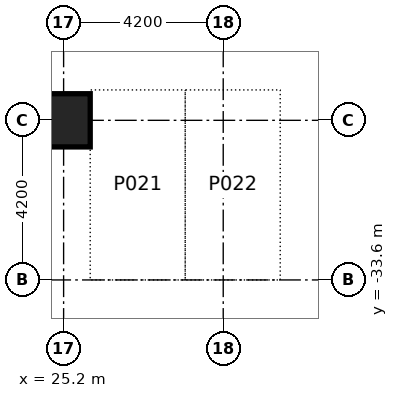
"""IFC4 building model, lengths in metres.
Left out: names, types, materials, properties, quantities, classifications, styles, units other than length and angle.
Written with IfcOpenShell. Run it as: python <this file> out.ifc"""

import sys

from ifc_helpers import new_model, si_unit, direction, frame, origin, origin_2d, place, context, subcontext, project, spatial, rectangle, extrude, element, save


model = new_model("IFC4")
c1 = context("Model", 3, precision=1e-05, world=origin(), true_north=direction((0.0, 1.0)))
c2 = subcontext(c1, "Body", "Model", "MODEL_VIEW")
j1 = project(units=[si_unit("LENGTHUNIT", "METRE"), si_unit("PLANEANGLEUNIT", "RADIAN")], contexts=[c1])
p1 = place(None, origin())
s1 = spatial("IfcSite", under=j1, at=p1, CompositionType="ELEMENT")
p2 = place(p1, origin())
s2 = spatial("IfcBuilding", under=s1, at=p2, CompositionType="ELEMENT")
p3 = place(p2, frame((0.0, 0.0, -4.2)))
s3 = spatial("IfcBuildingStorey", under=s2, at=p3, CompositionType="ELEMENT", Elevation=-4.2)
p4 = place(p3, frame((25.2, -29.4, 0.0), z_axis=(0.0, 0.0, 1.0), x_axis=(1.0, 0.0, 0.0)))
e1 = element("IfcColumn", 1, at=p4, inside=s3, PredefinedType="COLUMN", context=c2, shape_type="SweptSolid", body=[
    extrude(rectangle(XDim=1.4, YDim=1.4, at=origin_2d()), origin(), (0.0, 0.0, 1.0), 4.2),
])
save(model, sys.argv[1])
